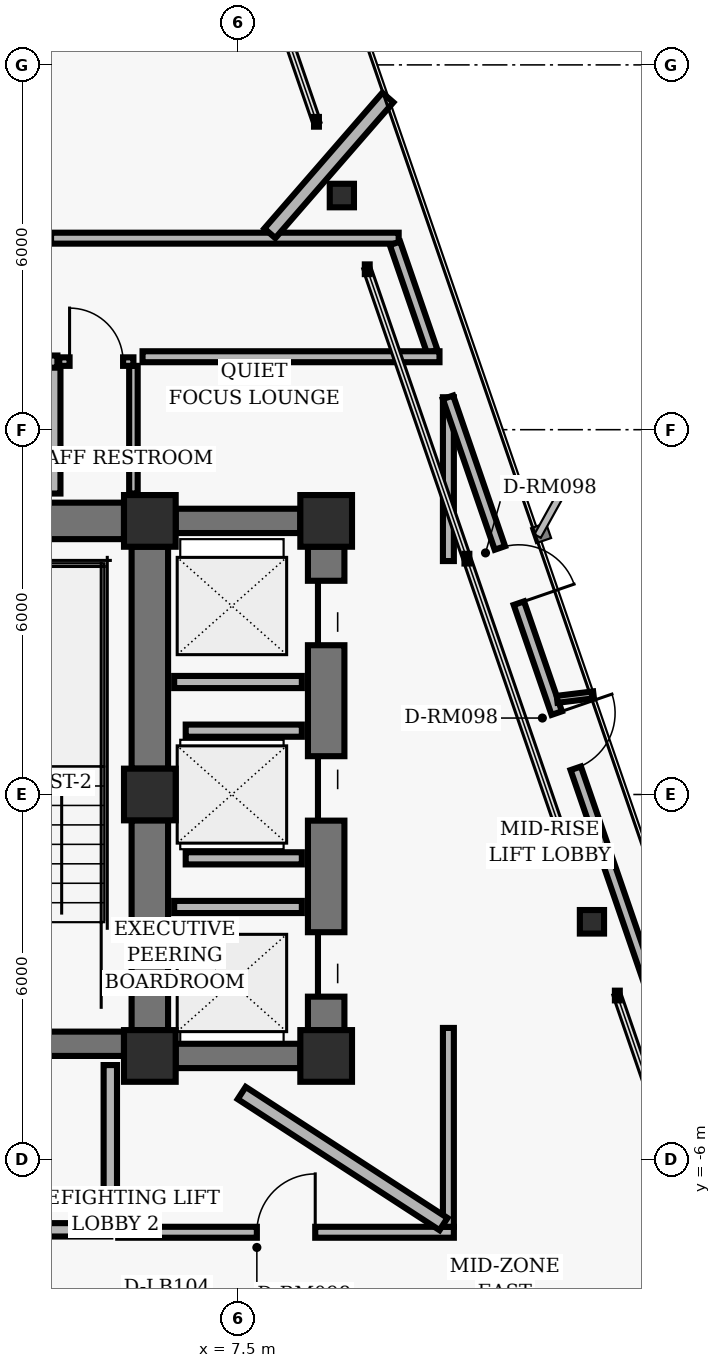
"""IFC4 building model, lengths in metres.
Left out: names, types, materials, properties, quantities, classifications, styles, units other than length and angle.
Written with IfcOpenShell. Run it as: python <this file> out.ifc"""

import sys

from ifc_helpers import new_model, si_unit, direction, frame, frame_2d, origin, origin_2d, place, context, subcontext, project, spatial, rectangle, hollow_rectangle, i_section, extrude, element, fill, save


model = new_model("IFC4")
c1 = context("Model", 3, precision=1e-05, world=origin(), true_north=direction((0.0, 1.0)))
c2 = subcontext(c1, "Body", "Model", "MODEL_VIEW")
j1 = project(units=[si_unit("LENGTHUNIT", "METRE"), si_unit("PLANEANGLEUNIT", "RADIAN")], contexts=[c1])
p1 = place(None, origin())
s1 = spatial("IfcSite", under=j1, at=p1, CompositionType="ELEMENT")
p2 = place(p1, origin())
s2 = spatial("IfcBuilding", under=s1, at=p2, CompositionType="ELEMENT")
p3 = place(p2, frame((0.0, 0.0, 159.36)))
s3 = spatial("IfcBuildingStorey", under=s2, at=p3, CompositionType="ELEMENT", Elevation=159.36)
for number, where, z_axis, x_axis in (
    (1, (6.05, 4.5, 0.0), (0.0, 0.0, 1.0), (1.0, 0.0, 0.0)),
    (2, (6.05, 0.0, 0.0), (0.0, 0.0, 1.0), (1.0, 0.0, 0.0)),
    (3, (6.05, -4.3, 0.0), (0.0, 0.0, 1.0), (1.0, 0.0, 0.0)),
    (4, (8.95, 4.5, 0.0), (0.0, 0.0, 1.0), (1.0, 0.0, 0.0)),
    (5, (8.95, -4.3, 0.0), (0.0, 0.0, 1.0), (1.0, 0.0, 0.0)),
):
    element("IfcColumn", number, at=place(p3, frame(where, z_axis=z_axis, x_axis=x_axis)), inside=s3, PredefinedType="COLUMN", context=c2, shape_type="SweptSolid", body=[
        extrude(hollow_rectangle(XDim=0.85, YDim=0.85, WallThickness=0.055, InnerFilletRadius=0.02, OuterFilletRadius=0.04, at=origin_2d()), origin(), (0.0, 0.0, 1.0), 3.04),
    ])
p4 = place(p3, frame((6.05, 0.425, 0.0), z_axis=(0.0, 0.0, 1.0), x_axis=(0.0, 1.0, 0.0)))
e6 = element("IfcWall", 6, at=p4, inside=s3, PredefinedType="SHEAR", context=c2, shape_type="SweptSolid", body=[
    extrude(rectangle(XDim=3.65, YDim=0.6, at=frame_2d((1.825, 0.0))), origin(), (0.0, 0.0, 1.0), 2.788),
])
p5 = place(p3, frame((6.05, -3.875, 0.0), z_axis=(0.0, 0.0, 1.0), x_axis=(0.0, 1.0, 0.0)))
e7 = element("IfcWall", 7, at=p5, inside=s3, PredefinedType="SHEAR", context=c2, shape_type="SweptSolid", body=[
    extrude(rectangle(XDim=3.45, YDim=0.6, at=frame_2d((1.725, 0.0))), origin(), (0.0, 0.0, 1.0), 2.788),
])
p6 = place(p3, frame((-5.625, -4.1, 0.0), z_axis=(0.0, 0.0, 1.0), x_axis=(1.0, 0.0, 0.0)))
e8 = element("IfcWall", 8, at=p6, inside=s3, PredefinedType="SHEAR", context=c2, shape_type="SweptSolid", body=[
    extrude(rectangle(XDim=11.25, YDim=0.4, at=frame_2d((5.625, 0.0))), origin(), (0.0, 0.0, 1.0), 2.788),
])
p7 = place(p6, frame((1.355, 0.0, 0.0)))
e9 = element("IfcOpeningElement", 9, at=p7, cuts=e8, PredefinedType="OPENING", context=c2, shape_type="SweptSolid", body=[
    extrude(rectangle(XDim=1.1, YDim=2.04, at=frame_2d((0.55, 1.02))), frame((0.0, 0.21, 0.0), z_axis=(0.0, -1.0, 0.0), x_axis=(1.0, 0.0, 0.0)), (0.0, 0.0, 1.0), 0.42),
])
p8 = place(p6, frame((8.795, 0.0, 0.0)))
e10 = element("IfcOpeningElement", 10, at=p8, cuts=e8, PredefinedType="OPENING", context=c2, shape_type="SweptSolid", body=[
    extrude(rectangle(XDim=1.1, YDim=2.04, at=frame_2d((0.55, 1.02))), frame((0.0, 0.21, 0.0), z_axis=(0.0, -1.0, 0.0), x_axis=(1.0, 0.0, 0.0)), (0.0, 0.0, 1.0), 0.42),
])
p9 = place(p6, frame((4.095, 0.0, 0.0)))
e11 = element("IfcOpeningElement", 11, at=p9, cuts=e8, PredefinedType="OPENING", context=c2, shape_type="SweptSolid", body=[
    extrude(rectangle(XDim=1.06, YDim=2.04, at=frame_2d((0.53, 1.02))), frame((0.0, 0.21, 0.0), z_axis=(0.0, -1.0, 0.0), x_axis=(1.0, 0.0, 0.0)), (0.0, 0.0, 1.0), 0.42),
])
p10 = place(p6, frame((6.095, 0.0, 0.0)))
e12 = element("IfcOpeningElement", 12, at=p10, cuts=e8, PredefinedType="OPENING", context=c2, shape_type="SweptSolid", body=[
    extrude(rectangle(XDim=1.06, YDim=2.04, at=frame_2d((0.53, 1.02))), frame((0.0, 0.21, 0.0), z_axis=(0.0, -1.0, 0.0), x_axis=(1.0, 0.0, 0.0)), (0.0, 0.0, 1.0), 0.42),
])
p11 = place(p3, frame((2.05, 4.5, 0.0), z_axis=(0.0, 0.0, 1.0), x_axis=(1.0, 0.0, 0.0)))
e13 = element("IfcWall", 13, at=p11, inside=s3, PredefinedType="SHEAR", context=c2, shape_type="SweptSolid", body=[
    extrude(rectangle(XDim=3.575, YDim=0.6, at=frame_2d((1.788, 0.0))), origin(), (0.0, 0.0, 1.0), 2.788),
])
p12 = place(p3, frame((8.95, -3.875, 0.0), z_axis=(0.0, 0.0, 1.0), x_axis=(0.0, 1.0, 0.0)))
e14 = element("IfcWall", 14, at=p12, inside=s3, PredefinedType="SHEAR", context=c2, shape_type="SweptSolid", body=[
    extrude(rectangle(XDim=7.95, YDim=0.6, at=frame_2d((3.975, 0.0))), origin(), (0.0, 0.0, 1.0), 2.788),
])
p13 = place(p12, frame((0.55, 0.0, 0.0)))
e15 = element("IfcOpeningElement", 15, at=p13, cuts=e14, PredefinedType="OPENING", context=c2, shape_type="SweptSolid", body=[
    extrude(rectangle(XDim=1.06, YDim=2.04, at=frame_2d((0.53, 1.02))), frame((0.0, 0.31, 0.0), z_axis=(0.0, -1.0, 0.0), x_axis=(1.0, 0.0, 0.0)), (0.0, 0.0, 1.0), 0.62),
])
p14 = place(p12, frame((3.445, 0.0, 0.0)))
e16 = element("IfcOpeningElement", 16, at=p14, cuts=e14, PredefinedType="OPENING", context=c2, shape_type="SweptSolid", body=[
    extrude(rectangle(XDim=1.06, YDim=2.04, at=frame_2d((0.53, 1.02))), frame((0.0, 0.31, 0.0), z_axis=(0.0, -1.0, 0.0), x_axis=(1.0, 0.0, 0.0)), (0.0, 0.0, 1.0), 0.62),
])
p15 = place(p12, frame((6.33, 0.0, 0.0)))
e17 = element("IfcOpeningElement", 17, at=p15, cuts=e14, PredefinedType="OPENING", context=c2, shape_type="SweptSolid", body=[
    extrude(rectangle(XDim=1.06, YDim=2.04, at=frame_2d((0.53, 1.02))), frame((0.0, 0.31, 0.0), z_axis=(0.0, -1.0, 0.0), x_axis=(1.0, 0.0, 0.0)), (0.0, 0.0, 1.0), 0.62),
])
for number, where, z_axis, x_axis in (
    (18, (6.475, 4.5, 0.0), (0.0, 0.0, 1.0), (1.0, 0.0, 0.0)),
    (19, (6.475, -4.3, 0.0), (0.0, 0.0, 1.0), (1.0, 0.0, 0.0)),
):
    element("IfcWall", number, at=place(p3, frame(where, z_axis=z_axis, x_axis=x_axis)), inside=s3, PredefinedType="SHEAR", context=c2, shape_type="SweptSolid", body=[
        extrude(rectangle(XDim=2.05, YDim=0.4, at=frame_2d((1.025, 0.0))), origin(), (0.0, 0.0, 1.0), 2.788),
    ])
for number, where, z_axis, x_axis in (
    (20, (13.321, -2.094, 0.0), (0.0, 0.0, 1.0), (1.0, 0.0, 0.0)),
    (21, (9.208, 9.851, 0.0), (0.0, 0.0, 1.0), (1.0, 0.0, 0.0)),
):
    element("IfcColumn", number, at=place(p3, frame(where, z_axis=z_axis, x_axis=x_axis)), inside=s3, PredefinedType="COLUMN", context=c2, shape_type="SweptSolid", body=[
        extrude(i_section(OverallWidth=0.398, OverallDepth=0.387, WebThickness=0.021, FlangeThickness=0.033, FilletRadius=0.018, at=origin_2d()), origin(), (0.0, 0.0, 1.0), 3.04),
    ])
p16 = place(p3, frame((5.4, -7.16, 0.0), z_axis=(0.0, 0.0, 1.0), x_axis=(0.0, 1.0, 0.0)))
e22 = element("IfcWall", 22, at=p16, inside=s3, PredefinedType="PARTITIONING", context=c2, shape_type="SweptSolid", body=[
    extrude(rectangle(XDim=2.71, YDim=0.22, at=frame_2d((1.355, 0.0))), origin(), (0.0, 0.0, 1.0), 2.763),
])
p17 = place(p3, frame((0.0, -7.16, 0.0), z_axis=(0.0, 0.0, 1.0), x_axis=(1.0, 0.0, 0.0)))
e23 = element("IfcWall", 23, at=p17, inside=s3, PredefinedType="PARTITIONING", context=c2, shape_type="SweptSolid", body=[
    extrude(rectangle(XDim=5.4, YDim=0.22, at=frame_2d((2.7, 0.0))), origin(), (0.0, 0.0, 1.0), 2.33),
])
p18 = place(p17, frame((2.05, 0.0, 0.0)))
e24 = element("IfcOpeningElement", 24, at=p18, cuts=e23, PredefinedType="OPENING", context=c2, shape_type="SweptSolid", body=[
    extrude(rectangle(XDim=1.12, YDim=2.02, at=frame_2d((0.56, 1.01))), frame((0.0, 0.12, 0.0), z_axis=(0.0, -1.0, 0.0), x_axis=(1.0, 0.0, 0.0)), (0.0, 0.0, 1.0), 0.24),
])
p19 = place(p3, frame((4.48, 4.95, 0.0), z_axis=(0.0, 0.0, 1.0), x_axis=(0.0, 1.0, 0.0)))
e25 = element("IfcWall", 25, at=p19, inside=s3, PredefinedType="PARTITIONING", context=c2, shape_type="SweptSolid", body=[
    extrude(rectangle(XDim=2.1, YDim=0.2, at=frame_2d((1.05, 0.0))), origin(), (0.0, 0.0, 1.0), 2.763),
])
p20 = place(p3, frame((2.15, 7.12, 0.0), z_axis=(0.0, 0.0, 1.0), x_axis=(1.0, 0.0, 0.0)))
e26 = element("IfcWall", 26, at=p20, inside=s3, PredefinedType="PARTITIONING", context=c2, shape_type="SweptSolid", body=[
    extrude(rectangle(XDim=2.38, YDim=0.2, at=frame_2d((1.19, 0.0))), origin(), (0.0, 0.0, 1.0), 2.763),
])
p21 = place(p20, frame((0.56, 0.0, 0.0)))
e27 = element("IfcOpeningElement", 27, at=p21, cuts=e26, PredefinedType="OPENING", context=c2, shape_type="SweptSolid", body=[
    extrude(rectangle(XDim=1.26, YDim=2.06, at=frame_2d((0.63, 1.03))), frame((0.0, 0.11, 0.0), z_axis=(0.0, -1.0, 0.0), x_axis=(1.0, 0.0, 0.0)), (0.0, 0.0, 1.0), 0.22),
])
p22 = place(p3, frame((5.78, 4.95, 0.0), z_axis=(0.0, 0.0, 1.0), x_axis=(0.0, 1.0, 0.0)))
e28 = element("IfcWall", 28, at=p22, inside=s3, PredefinedType="PARTITIONING", context=c2, shape_type="SweptSolid", body=[
    extrude(rectangle(XDim=2.1, YDim=0.14, at=frame_2d((1.05, 0.0))), origin(), (0.0, 0.0, 1.0), 2.763),
])
p23 = place(p3, frame((4.56, 7.12, 0.0), z_axis=(0.0, 0.0, 1.0), x_axis=(1.0, 0.0, 0.0)))
e29 = element("IfcWall", 29, at=p23, inside=s3, PredefinedType="PARTITIONING", context=c2, shape_type="SweptSolid", body=[
    extrude(rectangle(XDim=1.22, YDim=0.14, at=frame_2d((0.61, 0.0))), origin(), (0.0, 0.0, 1.0), 2.763),
])
p24 = place(p23, frame((0.17, 0.0, 0.0)))
e30 = element("IfcOpeningElement", 30, at=p24, cuts=e29, PredefinedType="OPENING", context=c2, shape_type="SweptSolid", body=[
    extrude(rectangle(XDim=0.88, YDim=2.02, at=frame_2d((0.44, 1.01))), frame((0.0, 0.08, 0.0), z_axis=(0.0, -1.0, 0.0), x_axis=(1.0, 0.0, 0.0)), (0.0, 0.0, 1.0), 0.16),
])
for number, where, z_axis, x_axis in (
    (31, (6.45, -1.85, 0.0), (0.0, 0.0, 1.0), (1.0, 0.0, 0.0)),
    (32, (6.45, 1.85, 0.0), (0.0, 0.0, 1.0), (1.0, 0.0, 0.0)),
):
    element("IfcWall", number, at=place(p3, frame(where, z_axis=z_axis, x_axis=x_axis)), inside=s3, PredefinedType="PARTITIONING", context=c2, shape_type="SweptSolid", body=[
        extrude(rectangle(XDim=2.1, YDim=0.2, at=frame_2d((1.05, 0.0))), origin(), (0.0, 0.0, 1.0), 2.763),
    ])
for number, where, z_axis, x_axis in (
    (33, (6.64, -1.05, 0.0), (0.0, 0.0, 1.0), (1.0, 0.0, 0.0)),
    (34, (6.64, 1.05, 0.0), (0.0, 0.0, 1.0), (1.0, 0.0, 0.0)),
):
    element("IfcWall", number, at=place(p3, frame(where, z_axis=z_axis, x_axis=x_axis)), inside=s3, PredefinedType="PARTITIONING", context=c2, shape_type="SweptSolid", body=[
        extrude(rectangle(XDim=1.91, YDim=0.2, at=frame_2d((0.955, 0.0))), origin(), (0.0, 0.0, 1.0), 2.763),
    ])
p25 = place(p3, frame((-6.52, 9.15, 0.0), z_axis=(0.0, 0.0, 1.0), x_axis=(1.0, 0.0, 0.0)))
e35 = element("IfcWall", 35, at=p25, inside=s3, PredefinedType="PARTITIONING", context=c2, shape_type="SweptSolid", body=[
    extrude(rectangle(XDim=16.662, YDim=0.18, at=frame_2d((8.331, 0.0))), origin(), (0.0, 0.0, 1.0), 2.763),
])
p26 = place(p25, frame((9.985, 0.0, 0.0)))
e36 = element("IfcOpeningElement", 36, at=p26, cuts=e35, PredefinedType="OPENING", context=c2, shape_type="SweptSolid", body=[
    extrude(rectangle(XDim=0.96, YDim=2.02, at=frame_2d((0.48, 1.01))), frame((0.0, 0.1, 0.0), z_axis=(0.0, -1.0, 0.0), x_axis=(1.0, 0.0, 0.0)), (0.0, 0.0, 1.0), 0.2),
])
p27 = place(p25, frame((2.719, 0.0, 0.0)))
e37 = element("IfcOpeningElement", 37, at=p27, cuts=e35, PredefinedType="OPENING", context=c2, shape_type="SweptSolid", body=[
    extrude(rectangle(XDim=1.18, YDim=2.02, at=frame_2d((0.59, 1.01))), frame((0.0, 0.1, 0.0), z_axis=(0.0, -1.0, 0.0), x_axis=(1.0, 0.0, 0.0)), (0.0, 0.0, 1.0), 0.2),
])
p28 = place(p3, frame((10.082, 9.065, 0.0), z_axis=(0.0, 0.0, 1.0), x_axis=(0.325550958337, -0.945524496524, 0.0)))
e38 = element("IfcWall", 38, at=p28, inside=s3, PredefinedType="PARTITIONING", context=c2, shape_type="SweptSolid", body=[
    extrude(rectangle(XDim=1.882, YDim=0.18, at=frame_2d((0.941, 0.0))), origin(), (0.0, 0.0, 1.0), 2.763),
])
p29 = place(p3, frame((10.814, 7.2, 0.0), z_axis=(0.0, 0.0, 1.0), x_axis=(-1.0, 0.0, 0.0)))
e39 = element("IfcWall", 39, at=p29, inside=s3, PredefinedType="PARTITIONING", context=c2, shape_type="SweptSolid", body=[
    extrude(rectangle(XDim=4.884, YDim=0.18, at=frame_2d((2.442, 0.0))), origin(), (0.0, 0.0, 1.0), 2.763),
])
p30 = place(p3, frame((5.53, -7.2, 0.0), z_axis=(0.0, 0.0, 1.0), x_axis=(1.0, 0.0, 0.0)))
e40 = element("IfcWall", 40, at=p30, inside=s3, PredefinedType="PARTITIONING", context=c2, shape_type="SweptSolid", body=[
    extrude(rectangle(XDim=5.52, YDim=0.18, at=frame_2d((2.76, 0.0))), origin(), (0.0, 0.0, 1.0), 2.33),
])
p31 = place(p30, frame((2.28, 0.0, 0.0)))
e41 = element("IfcOpeningElement", 41, at=p31, cuts=e40, PredefinedType="OPENING", context=c2, shape_type="SweptSolid", body=[
    extrude(rectangle(XDim=0.96, YDim=2.02, at=frame_2d((0.48, 1.01))), frame((0.0, 0.1, 0.0), z_axis=(0.0, -1.0, 0.0), x_axis=(1.0, 0.0, 0.0)), (0.0, 0.0, 1.0), 0.2),
])
p32 = place(p3, frame((10.96, -7.11, 0.0), z_axis=(0.0, 0.0, 1.0), x_axis=(0.0, 1.0, 0.0)))
e42 = element("IfcWall", 42, at=p32, inside=s3, PredefinedType="PARTITIONING", context=c2, shape_type="SweptSolid", body=[
    extrude(rectangle(XDim=3.271, YDim=0.18, at=frame_2d((1.635, 0.0))), origin(), (0.0, 0.0, 1.0), 2.763),
])
p33 = place(p3, frame((10.96, 3.84, 0.0), z_axis=(0.0, 0.0, 1.0), x_axis=(0.0, 1.0, 0.0)))
e43 = element("IfcWall", 43, at=p33, inside=s3, PredefinedType="PARTITIONING", context=c2, shape_type="SweptSolid", body=[
    extrude(rectangle(XDim=2.694, YDim=0.18, at=frame_2d((1.347, 0.0))), origin(), (0.0, 0.0, 1.0), 2.33),
])
p34 = place(p3, frame((10.954, 6.533, 0.0), z_axis=(0.0, 0.0, 1.0), x_axis=(0.325553439946, -0.945523642084, 0.0)))
e44 = element("IfcWall", 44, at=p34, inside=s3, PredefinedType="PARTITIONING", context=c2, shape_type="SweptSolid", body=[
    extrude(rectangle(XDim=11.22, YDim=0.18, at=frame_2d((5.61, 0.0))), origin(), (0.0, 0.0, 1.0), 2.763),
])
p35 = place(p34, frame((5.493, 0.0, 0.0)))
e45 = element("IfcOpeningElement", 45, at=p35, cuts=e44, PredefinedType="OPENING", context=c2, shape_type="SweptSolid", body=[
    extrude(rectangle(XDim=0.96, YDim=2.02, at=frame_2d((0.48, 1.01))), frame((0.0, 0.1, 0.0), z_axis=(0.0, -1.0, 0.0), x_axis=(1.0, 0.0, 0.0)), (0.0, 0.0, 1.0), 0.2),
])
p36 = place(p34, frame((2.621, 0.0, 0.0)))
e46 = element("IfcOpeningElement", 46, at=p36, cuts=e44, PredefinedType="OPENING", context=c2, shape_type="SweptSolid", body=[
    extrude(rectangle(XDim=0.96, YDim=2.02, at=frame_2d((0.48, 1.01))), frame((0.0, 0.1, 0.0), z_axis=(0.0, -1.0, 0.0), x_axis=(1.0, 0.0, 0.0)), (0.0, 0.0, 1.0), 0.2),
])
p37 = place(p3, frame((7.561, -4.91, 0.0), z_axis=(0.0, 0.0, 1.0), x_axis=(0.838633829817, -0.544695602595, 0.0)))
e47 = element("IfcWall", 47, at=p37, inside=s3, PredefinedType="PARTITIONING", context=c2, shape_type="SweptSolid", body=[
    extrude(rectangle(XDim=3.958, YDim=0.24, at=frame_2d((1.979, 0.0))), origin(), (0.0, 0.0, 1.0), 2.132),
])
p38 = place(p3, frame((12.749, 1.565, 0.0), z_axis=(0.0, 0.0, 1.0), x_axis=(0.992500437265, 0.122241081588, 0.0)))
e48 = element("IfcWall", 48, at=p38, inside=s3, PredefinedType="MOVABLE", context=c2, shape_type="SweptSolid", body=[
    extrude(rectangle(XDim=0.603, YDim=0.115, at=frame_2d((0.302, 0.0))), origin(), (0.0, 0.0, 1.0), 2.763),
])
p39 = place(p3, frame((8.023, 9.23, 0.0), z_axis=(0.0, 0.0, 1.0), x_axis=(0.656082692906, 0.754689008844, 0.0)))
e49 = element("IfcWall", 49, at=p39, inside=s3, PredefinedType="PARTITIONING", context=c2, shape_type="SweptSolid", body=[
    extrude(rectangle(XDim=2.959, YDim=0.24, at=frame_2d((1.479, 0.0))), origin(), (0.0, 0.0, 1.0), 2.763),
])
p40 = place(p24, origin())
e50 = element("IfcDoor", 50, at=p40, inside=s3, OperationType="SINGLE_SWING_LEFT", PredefinedType="DOOR", context=c2, shape_type="SweptSolid", body=[
    extrude(rectangle(XDim=0.88, YDim=2.02, at=frame_2d((0.44, 1.01))), frame((0.0, 0.025, 0.0), z_axis=(0.0, -1.0, 0.0), x_axis=(1.0, 0.0, 0.0)), (0.0, 0.0, 1.0), 0.05),
])
fill(e30, e50)
p41 = place(p13, origin())
e51 = element("IfcDoor", 51, at=p41, inside=s3, OperationType="SLIDING_TO_LEFT", PredefinedType="DOOR", context=c2, shape_type="SweptSolid", body=[
    extrude(rectangle(XDim=1.06, YDim=2.04, at=frame_2d((0.53, 1.02))), frame((0.0, 0.025, 0.0), z_axis=(0.0, -1.0, 0.0), x_axis=(1.0, 0.0, 0.0)), (0.0, 0.0, 1.0), 0.05),
])
fill(e15, e51)
p42 = place(p14, origin())
e52 = element("IfcDoor", 52, at=p42, inside=s3, OperationType="SLIDING_TO_RIGHT", PredefinedType="DOOR", context=c2, shape_type="SweptSolid", body=[
    extrude(rectangle(XDim=1.06, YDim=2.04, at=frame_2d((0.53, 1.02))), frame((0.0, 0.025, 0.0), z_axis=(0.0, -1.0, 0.0), x_axis=(1.0, 0.0, 0.0)), (0.0, 0.0, 1.0), 0.05),
])
fill(e16, e52)
p43 = place(p15, origin())
e53 = element("IfcDoor", 53, at=p43, inside=s3, OperationType="SLIDING_TO_LEFT", PredefinedType="DOOR", context=c2, shape_type="SweptSolid", body=[
    extrude(rectangle(XDim=1.06, YDim=2.04, at=frame_2d((0.53, 1.02))), frame((0.0, 0.025, 0.0), z_axis=(0.0, -1.0, 0.0), x_axis=(1.0, 0.0, 0.0)), (0.0, 0.0, 1.0), 0.05),
])
fill(e17, e53)
p44 = place(p31, origin())
e54 = element("IfcDoor", 54, at=p44, inside=s3, OperationType="SINGLE_SWING_RIGHT", PredefinedType="DOOR", context=c2, shape_type="SweptSolid", body=[
    extrude(rectangle(XDim=0.96, YDim=2.02, at=frame_2d((0.48, 1.01))), frame((0.0, 0.025, 0.0), z_axis=(0.0, -1.0, 0.0), x_axis=(1.0, 0.0, 0.0)), (0.0, 0.0, 1.0), 0.05),
])
fill(e41, e54)
p45 = place(p35, origin())
e55 = element("IfcDoor", 55, at=p45, inside=s3, OperationType="SINGLE_SWING_LEFT", PredefinedType="DOOR", context=c2, shape_type="SweptSolid", body=[
    extrude(rectangle(XDim=0.96, YDim=2.02, at=frame_2d((0.48, 1.01))), frame((0.0, 0.025, 0.0), z_axis=(0.0, -1.0, 0.0), x_axis=(1.0, 0.0, 0.0)), (0.0, 0.0, 1.0), 0.05),
])
fill(e45, e55)
p46 = place(p36, origin())
e56 = element("IfcDoor", 56, at=p46, inside=s3, OperationType="SINGLE_SWING_RIGHT", PredefinedType="DOOR", context=c2, shape_type="SweptSolid", body=[
    extrude(rectangle(XDim=0.96, YDim=2.02, at=frame_2d((0.48, 1.01))), frame((0.0, 0.025, 0.0), z_axis=(0.0, -1.0, 0.0), x_axis=(1.0, 0.0, 0.0)), (0.0, 0.0, 1.0), 0.05),
])
fill(e46, e56)
save(model, sys.argv[1])
